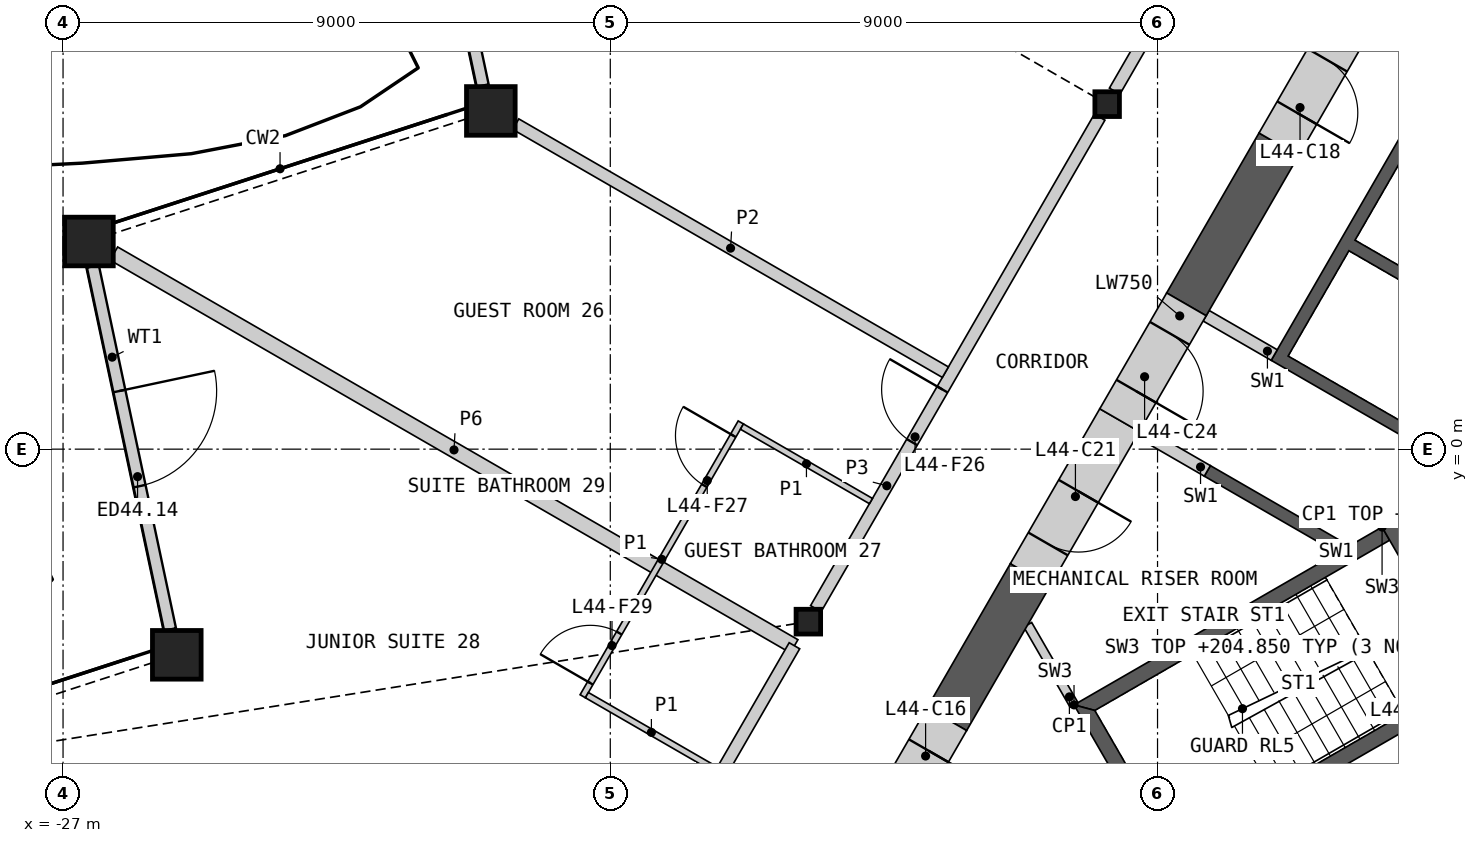
"""IFC4 building model, lengths in metres.
Left out: names, types, materials, properties, quantities, classifications, styles, units other than length and angle.
Written with IfcOpenShell. Run it as: python <this file> out.ifc"""

import sys

from ifc_helpers import new_model, si_unit, direction, frame, frame_2d, origin, origin_2d, place, context, subcontext, project, spatial, polyline, rectangle, hollow_rectangle, i_section, outline, extrude, element, fill, save


model = new_model("IFC4")
c1 = context("Model", 3, precision=1e-05, world=origin(), true_north=direction((0.0, 1.0)))
c2 = subcontext(c1, "Body", "Model", "MODEL_VIEW")
j1 = project(units=[si_unit("LENGTHUNIT", "METRE"), si_unit("PLANEANGLEUNIT", "RADIAN")], contexts=[c1])
p1 = place(None, origin())
s1 = spatial("IfcSite", under=j1, at=p1, CompositionType="ELEMENT")
p2 = place(p1, origin())
s2 = spatial("IfcBuilding", under=s1, at=p2, CompositionType="ELEMENT")
p3 = place(p2, frame((0.0, 0.0, 201.6)))
s3 = spatial("IfcBuildingStorey", under=s2, at=p3, CompositionType="ELEMENT", Elevation=201.6)
for number, where, z_axis, x_axis in (
    (1, (-19.965, 5.563, 0.0), (0.0, 0.0, 1.0), (1.0, 0.0, 0.0)),
    (2, (-26.574, 3.415, 0.0), (0.0, 0.0, 1.0), (1.0, 0.0, 0.0)),
    (3, (-25.129, -3.383, 0.0), (0.0, 0.0, 1.0), (1.0, 0.0, 0.0)),
):
    element("IfcColumn", number, at=place(p3, frame(where, z_axis=z_axis, x_axis=x_axis)), inside=s3, PredefinedType="COLUMN", context=c2, shape_type="SweptSolid", body=[
        extrude(hollow_rectangle(XDim=0.8, YDim=0.8, WallThickness=0.05, at=origin_2d()), origin(), (0.0, 0.0, 1.0), 3.6),
    ])
for number, where, z_axis, x_axis in (
    (4, (-9.828, 5.675, 0.0), (0.0, 0.0, 1.0), (1.0, 0.0, 0.0)),
    (5, (-14.743, -2.837, 0.0), (0.0, 0.0, 1.0), (1.0, 0.0, 0.0)),
):
    element("IfcColumn", number, at=place(p3, frame(where, z_axis=z_axis, x_axis=x_axis)), inside=s3, PredefinedType="COLUMN", context=c2, shape_type="SweptSolid", body=[
        extrude(i_section(OverallWidth=0.404, OverallDepth=0.407, WebThickness=0.027, FlangeThickness=0.044, at=origin_2d()), origin(), (0.0, 0.0, 1.0), 3.6),
    ])
p4 = place(p3, frame((-21.366, 11.944, 0.0), z_axis=(0.0, 0.0, 1.0), x_axis=(0.207912864597, -0.978147351238, 0.0)))
e6 = element("IfcWall", 6, at=p4, inside=s3, PredefinedType="SOLIDWALL", context=c2, shape_type="SweptSolid", body=[
    extrude(rectangle(XDim=6.098, YDim=0.2, at=frame_2d((3.049, 0.0))), origin(), (0.0, 0.0, 1.0), 2.701),
])
p5 = place(p4, frame((2.117, 0.0, 0.0)))
e7 = element("IfcOpeningElement", 7, at=p5, cuts=e6, PredefinedType="OPENING", context=c2, shape_type="SweptSolid", body=[
    extrude(rectangle(XDim=1.6, YDim=2.4, at=frame_2d((0.8, 1.2))), frame((0.0, 0.11, 0.0), z_axis=(0.0, -1.0, 0.0), x_axis=(1.0, 0.0, 0.0)), (0.0, 0.0, 1.0), 0.22),
])
p6 = place(p3, frame((-26.51, 3.006, 0.0), z_axis=(0.0, 0.0, 1.0), x_axis=(0.207920445063, -0.978145739921, 0.0)))
e8 = element("IfcWall", 8, at=p6, inside=s3, PredefinedType="SOLIDWALL", context=c2, shape_type="SweptSolid", body=[
    extrude(rectangle(XDim=6.106, YDim=0.2, at=frame_2d((3.053, 0.0))), origin(), (0.0, 0.0, 1.0), 2.701),
])
p7 = place(p6, frame((2.096, 0.0, 0.0)))
e9 = element("IfcOpeningElement", 9, at=p7, cuts=e8, PredefinedType="OPENING", context=c2, shape_type="SweptSolid", body=[
    extrude(rectangle(XDim=1.6, YDim=2.4, at=frame_2d((0.8, 1.2))), frame((0.0, 0.11, 0.0), z_axis=(0.0, -1.0, 0.0), x_axis=(1.0, 0.0, 0.0)), (0.0, 0.0, 1.0), 0.22),
])
p8 = place(p3, origin())
e10 = element("IfcWall", 10, at=p8, inside=s3, PredefinedType="SHEAR", context=c2, shape_type="SweptSolid", body=[
    extrude(outline(polyline([(-6.061, -1.697), (-8.231, -0.444), (-8.131, -0.271), (-5.96, -1.524), (-6.061, -1.697)])), origin(), (0.0, 0.0, 1.0), 3.25),
])
p9 = place(p3, origin())
e11 = element("IfcWall", 11, at=p9, inside=s3, PredefinedType="SHEAR", context=c2, shape_type="SweptSolid", body=[
    extrude(outline(polyline([(-4.96, 0.208), (-7.131, 1.461), (-3.731, 7.35), (-1.561, 6.097), (-1.66, 5.924), (-3.652, 7.074), (-4.652, 5.342), (-2.66, 4.192), (-2.76, 4.019), (-4.752, 5.169), (-5.752, 3.437), (-3.76, 2.287), (-3.861, 2.113), (-5.852, 3.263), (-6.852, 1.531), (-4.861, 0.381), (-4.96, 0.208)])), origin(), (0.0, 0.0, 1.0), 3.25),
])
for number, where, z_axis, x_axis in (
    (12, (-7.081, 1.548, 0.0), (0.0, 0.0, 1.0), (-0.866, 0.5, 0.0)),
    (13, (-8.181, -0.357, 0.0), (0.0, 0.0, 1.0), (-0.866, 0.5, 0.0)),
):
    element("IfcWall", number, at=place(p3, frame(where, z_axis=z_axis, x_axis=x_axis)), inside=s3, PredefinedType="SHEAR", context=c2, shape_type="SweptSolid", body=[
        extrude(rectangle(XDim=1.293, YDim=0.2, at=frame_2d((0.646, 0.0))), origin(), (0.0, 0.0, 1.0), 3.25),
    ])
p10 = place(p3, origin())
e14 = element("IfcWall", 14, at=p10, inside=s3, PredefinedType="SHEAR", context=c2, shape_type="SweptSolid", body=[
    extrude(outline(polyline([(-5.307, -1.281), (-10.374, -4.206), (-10.032, -4.298), (-5.182, -1.498), (-5.307, -1.281)])), origin(), (0.0, 0.0, 1.0), 3.25),
])
p11 = place(p3, origin())
e15 = element("IfcWall", 15, at=p11, inside=s3, PredefinedType="SHEAR", context=c2, shape_type="SweptSolid", body=[
    extrude(outline(polyline([(-10.374, -4.206), (-8.83, -6.881), (-8.738, -6.539), (-10.032, -4.298), (-10.374, -4.206)])), origin(), (0.0, 0.0, 1.0), 3.25),
])
p12 = place(p3, origin())
e16 = element("IfcWall", 16, at=p12, inside=s3, PredefinedType="SHEAR", context=c2, shape_type="SweptSolid", body=[
    extrude(outline(polyline([(-8.738, -6.539), (-8.83, -6.881), (-3.763, -3.956), (-3.888, -3.739), (-8.738, -6.539)])), origin(), (0.0, 0.0, 1.0), 3.25),
])
p13 = place(p3, frame((-5.199, -1.219, 0.0), z_axis=(0.0, 0.0, 1.0), x_axis=(0.499982516597, -0.866035497597, 0.0)))
e17 = element("IfcWall", 17, at=p13, inside=s3, PredefinedType="SHEAR", context=c2, shape_type="SweptSolid", body=[
    extrude(rectangle(XDim=3.088, YDim=0.25, at=frame_2d((1.544, 0.0))), origin(), (0.0, 0.0, 1.0), 3.25),
])
p14 = place(p13, frame((0.994, 0.0, 0.0)))
e18 = element("IfcOpeningElement", 18, at=p14, cuts=e17, PredefinedType="OPENING", context=c2, shape_type="SweptSolid", body=[
    extrude(rectangle(XDim=1.1, YDim=2.1, at=frame_2d((0.55, 1.05))), frame((0.0, 0.135, 0.0), z_axis=(0.0, -1.0, 0.0), x_axis=(1.0, 0.0, 0.0)), (0.0, 0.0, 1.0), 0.27),
])
p15 = place(p3, frame((-10.374, -4.206, 0.0), z_axis=(0.0, 0.0, 1.0), x_axis=(-0.500037110984, 0.866003976688, 0.0)))
e19 = element("IfcWall", 19, at=p15, inside=s3, PredefinedType="PARTITIONING", context=c2, shape_type="SweptSolid", body=[
    extrude(rectangle(XDim=1.522, YDim=0.15, at=frame_2d((0.761, 0.0))), origin(), (0.0, 0.0, 1.0), 3.25),
])
p16 = place(p3, frame((-7.006, 5.012, 0.0), z_axis=(0.0, 0.0, 1.0), x_axis=(-0.49996826437, -0.866043725583, 0.0)))
e20 = element("IfcWall", 20, at=p16, inside=s3, PredefinedType="SHEAR", context=c2, shape_type="SweptSolid", body=[
    extrude(rectangle(XDim=3.038, YDim=0.75, at=frame_2d((1.519, 0.0))), origin(), (0.0, 0.0, 1.0), 3.25),
])
p17 = place(p3, frame((-11.096, -2.07, 0.0), z_axis=(0.0, 0.0, 1.0), x_axis=(-0.49992834617, -0.86606676919, 0.0)))
e21 = element("IfcWall", 21, at=p17, inside=s3, PredefinedType="SHEAR", context=c2, shape_type="SweptSolid", body=[
    extrude(rectangle(XDim=2.737, YDim=0.75, at=frame_2d((1.369, 0.0))), origin(), (0.0, 0.0, 1.0), 3.25),
])
p18 = place(p3, frame((-12.464, -4.441, 0.0), z_axis=(0.0, 0.0, 1.0), x_axis=(-0.499994660107, -0.866028486751, 0.0)))
e22 = element("IfcWall", 22, at=p18, inside=s3, PredefinedType="SHEAR", context=c2, shape_type="SweptSolid", body=[
    extrude(rectangle(XDim=2.2, YDim=0.75, at=frame_2d((1.1, 0.0))), origin(), (0.0, 0.0, 1.0), 3.25),
])
p19 = place(p18, frame((0.6, 0.0, 0.0)))
e23 = element("IfcOpeningElement", 23, at=p19, cuts=e22, PredefinedType="OPENING", context=c2, shape_type="SweptSolid", body=[
    extrude(rectangle(XDim=1.0, YDim=2.1, at=frame_2d((0.5, 1.05))), frame((0.0, 0.385, 0.0), z_axis=(0.0, -1.0, 0.0), x_axis=(1.0, 0.0, 0.0)), (0.0, 0.0, 1.0), 0.77),
])
p20 = place(p3, frame((-5.906, 6.918, 0.0), z_axis=(0.0, 0.0, 1.0), x_axis=(-0.499946605688, -0.86605622881, 0.0)))
e24 = element("IfcWall", 24, at=p20, inside=s3, PredefinedType="SHEAR", context=c2, shape_type="SweptSolid", body=[
    extrude(rectangle(XDim=2.2, YDim=0.75, at=frame_2d((1.1, 0.0))), origin(), (0.0, 0.0, 1.0), 3.25),
])
p21 = place(p20, frame((0.6, 0.0, 0.0)))
e25 = element("IfcOpeningElement", 25, at=p21, cuts=e24, PredefinedType="OPENING", context=c2, shape_type="SweptSolid", body=[
    extrude(rectangle(XDim=1.0, YDim=2.1, at=frame_2d((0.5, 1.05))), frame((0.0, 0.385, 0.0), z_axis=(0.0, -1.0, 0.0), x_axis=(1.0, 0.0, 0.0)), (0.0, 0.0, 1.0), 0.77),
])
p22 = place(p3, frame((-9.625, 0.477, 0.0), z_axis=(0.0, 0.0, 1.0), x_axis=(-0.500005104963, -0.866022456413, 0.0)))
e26 = element("IfcWall", 26, at=p22, inside=s3, PredefinedType="SHEAR", context=c2, shape_type="SweptSolid", body=[
    extrude(rectangle(XDim=2.941, YDim=0.75, at=frame_2d((1.47, 0.0))), origin(), (0.0, 0.0, 1.0), 3.25),
])
p23 = place(p22, frame((1.35, 0.0, 0.0)))
e27 = element("IfcOpeningElement", 27, at=p23, cuts=e26, PredefinedType="OPENING", context=c2, shape_type="SweptSolid", body=[
    extrude(rectangle(XDim=1.0, YDim=2.1, at=frame_2d((0.5, 1.05))), frame((0.0, 0.385, 0.0), z_axis=(0.0, -1.0, 0.0), x_axis=(1.0, 0.0, 0.0)), (0.0, 0.0, 1.0), 0.77),
])
p24 = place(p3, frame((-8.525, 2.382, 0.0), z_axis=(0.0, 0.0, 1.0), x_axis=(-0.500077893725, -0.86598042715, 0.0)))
e28 = element("IfcWall", 28, at=p24, inside=s3, PredefinedType="SHEAR", context=c2, shape_type="SweptSolid", body=[
    extrude(rectangle(XDim=2.2, YDim=0.75, at=frame_2d((1.1, 0.0))), origin(), (0.0, 0.0, 1.0), 3.25),
])
p25 = place(p24, frame((0.55, 0.0, 0.0)))
e29 = element("IfcOpeningElement", 29, at=p25, cuts=e28, PredefinedType="OPENING", context=c2, shape_type="SweptSolid", body=[
    extrude(rectangle(XDim=1.1, YDim=2.1, at=frame_2d((0.55, 1.05))), frame((0.0, 0.385, 0.0), z_axis=(0.0, -1.0, 0.0), x_axis=(1.0, 0.0, 0.0)), (0.0, 0.0, 1.0), 0.77),
])
p26 = place(p3, frame((-26.164, 3.217, 0.0), z_axis=(0.0, 0.0, 1.0), x_axis=(0.866026026416, -0.499998921569, 0.0)))
e30 = element("IfcWall", 30, at=p26, inside=s3, PredefinedType="PARTITIONING", context=c2, shape_type="SweptSolid", body=[
    extrude(rectangle(XDim=12.918, YDim=0.25, at=frame_2d((6.459, 0.0))), origin(), (0.0, 0.0, 1.0), 2.404),
])
p27 = place(p3, frame((-9.705, 5.888, 0.0), z_axis=(0.0, 0.0, 1.0), x_axis=(0.50000393355, 0.866023132736, 0.0)))
e31 = element("IfcWall", 31, at=p27, inside=s3, PredefinedType="PARTITIONING", context=c2, shape_type="SweptSolid", body=[
    extrude(rectangle(XDim=9.335, YDim=0.2, at=frame_2d((4.667, 0.0))), origin(), (0.0, 0.0, 1.0), 3.25),
])
p28 = place(p27, frame((1.556, 0.0, 0.0)))
e32 = element("IfcOpeningElement", 32, at=p28, cuts=e31, PredefinedType="OPENING", context=c2, shape_type="SweptSolid", body=[
    extrude(rectangle(XDim=1.8, YDim=2.1, at=frame_2d((0.9, 1.05))), frame((0.0, 0.11, 0.0), z_axis=(0.0, -1.0, 0.0), x_axis=(1.0, 0.0, 0.0)), (0.0, 0.0, 1.0), 0.22),
])
p29 = place(p3, frame((-14.619, -2.624, 0.0), z_axis=(0.0, 0.0, 1.0), x_axis=(0.50000393355, 0.866023132736, 0.0)))
e33 = element("IfcWall", 33, at=p29, inside=s3, PredefinedType="PARTITIONING", context=c2, shape_type="SweptSolid", body=[
    extrude(rectangle(XDim=9.335, YDim=0.2, at=frame_2d((4.667, 0.0))), origin(), (0.0, 0.0, 1.0), 3.25),
])
p30 = place(p29, frame((3.163, 0.0, 0.0)))
e34 = element("IfcOpeningElement", 34, at=p30, cuts=e33, PredefinedType="OPENING", context=c2, shape_type="SweptSolid", body=[
    extrude(rectangle(XDim=1.0, YDim=2.1, at=frame_2d((0.5, 1.05))), frame((0.0, 0.11, 0.0), z_axis=(0.0, -1.0, 0.0), x_axis=(1.0, 0.0, 0.0)), (0.0, 0.0, 1.0), 0.22),
])
p31 = place(p3, frame((-17.744, -8.035, 0.0), z_axis=(0.0, 0.0, 1.0), x_axis=(0.500003221507, 0.866023543838, 0.0)))
e35 = element("IfcWall", 35, at=p31, inside=s3, PredefinedType="PARTITIONING", context=c2, shape_type="SweptSolid", body=[
    extrude(rectangle(XDim=5.545, YDim=0.2, at=frame_2d((2.772, 0.0))), origin(), (0.0, 0.0, 1.0), 3.25),
])
p32 = place(p31, frame((0.351, 0.0, 0.0)))
e36 = element("IfcOpeningElement", 36, at=p32, cuts=e35, PredefinedType="OPENING", context=c2, shape_type="SweptSolid", body=[
    extrude(rectangle(XDim=1.1, YDim=2.1, at=frame_2d((0.55, 1.05))), frame((0.0, 0.11, 0.0), z_axis=(0.0, -1.0, 0.0), x_axis=(1.0, 0.0, 0.0)), (0.0, 0.0, 1.0), 0.22),
])
p33 = place(p3, frame((-19.555, 5.345, 0.0), z_axis=(0.0, 0.0, 1.0), x_axis=(0.866026623601, -0.49999788721, 0.0)))
e37 = element("IfcWall", 37, at=p33, inside=s3, PredefinedType="PARTITIONING", context=c2, shape_type="SweptSolid", body=[
    extrude(rectangle(XDim=8.159, YDim=0.2, at=frame_2d((4.079, 0.0))), origin(), (0.0, 0.0, 1.0), 2.404),
])
p34 = place(p3, frame((-18.453, -4.064, 0.0), z_axis=(0.0, 0.0, 1.0), x_axis=(0.499971721724, 0.866041729639, 0.0)))
e38 = element("IfcWall", 38, at=p34, inside=s3, PredefinedType="PARTITIONING", context=c2, shape_type="SweptSolid", body=[
    extrude(rectangle(XDim=5.2, YDim=0.1, at=frame_2d((2.6, 0.0))), origin(), (0.0, 0.0, 1.0), 2.404),
])
p35 = place(p34, frame((4.0, 0.0, 0.0)))
e39 = element("IfcOpeningElement", 39, at=p35, cuts=e38, PredefinedType="OPENING", context=c2, shape_type="SweptSolid", body=[
    extrude(rectangle(XDim=0.95, YDim=2.1, at=frame_2d((0.475, 1.05))), frame((0.0, 0.06, 0.0), z_axis=(0.0, -1.0, 0.0), x_axis=(1.0, 0.0, 0.0)), (0.0, 0.0, 1.0), 0.12),
])
p36 = place(p34, frame((0.25, 0.0, 0.0)))
e40 = element("IfcOpeningElement", 40, at=p36, cuts=e38, PredefinedType="OPENING", context=c2, shape_type="SweptSolid", body=[
    extrude(rectangle(XDim=0.95, YDim=2.1, at=frame_2d((0.475, 1.05))), frame((0.0, 0.06, 0.0), z_axis=(0.0, -1.0, 0.0), x_axis=(1.0, 0.0, 0.0)), (0.0, 0.0, 1.0), 0.12),
])
p37 = place(p3, frame((-15.835, 0.371, 0.0), z_axis=(0.0, 0.0, 1.0), x_axis=(0.866014668023, -0.500018594424, 0.0)))
e41 = element("IfcWall", 41, at=p37, inside=s3, PredefinedType="PARTITIONING", context=c2, shape_type="SweptSolid", body=[
    extrude(rectangle(XDim=2.45, YDim=0.1, at=frame_2d((1.225, 0.0))), origin(), (0.0, 0.0, 1.0), 2.404),
])
p38 = place(p3, frame((-18.385, -4.046, 0.0), z_axis=(0.0, 0.0, 1.0), x_axis=(0.866057815567, -0.499943856944, 0.0)))
e42 = element("IfcWall", 42, at=p38, inside=s3, PredefinedType="PARTITIONING", context=c2, shape_type="SweptSolid", body=[
    extrude(rectangle(XDim=2.45, YDim=0.1, at=frame_2d((1.225, 0.0))), origin(), (0.0, 0.0, 1.0), 2.404),
])
p39 = place(p7, origin())
e43 = element("IfcDoor", 43, at=p39, inside=s3, OperationType="DOUBLE_DOOR_SINGLE_SWING", PredefinedType="DOOR", context=c2, shape_type="SweptSolid", body=[
    extrude(rectangle(XDim=1.6, YDim=2.4, at=frame_2d((0.8, 1.2))), frame((0.0, 0.025, 0.0), z_axis=(0.0, -1.0, 0.0), x_axis=(1.0, 0.0, 0.0)), (0.0, 0.0, 1.0), 0.05),
])
fill(e9, e43)
p40 = place(p19, origin())
e44 = element("IfcDoor", 44, at=p40, inside=s3, OperationType="SINGLE_SWING_LEFT", PredefinedType="DOOR", context=c2, shape_type="SweptSolid", body=[
    extrude(rectangle(XDim=1.0, YDim=2.1, at=frame_2d((0.5, 1.05))), frame((0.0, 0.13, 0.0), z_axis=(0.0, -1.0, 0.0), x_axis=(1.0, 0.0, 0.0)), (0.0, 0.0, 1.0), 0.05),
])
fill(e23, e44)
p41 = place(p21, origin())
e45 = element("IfcDoor", 45, at=p41, inside=s3, OperationType="SINGLE_SWING_RIGHT", PredefinedType="DOOR", context=c2, shape_type="SweptSolid", body=[
    extrude(rectangle(XDim=1.0, YDim=2.1, at=frame_2d((0.5, 1.05))), frame((0.0, 0.13, 0.0), z_axis=(0.0, -1.0, 0.0), x_axis=(1.0, 0.0, 0.0)), (0.0, 0.0, 1.0), 0.05),
])
fill(e25, e45)
p42 = place(p23, origin())
e46 = element("IfcDoor", 46, at=p42, inside=s3, OperationType="SINGLE_SWING_LEFT", PredefinedType="DOOR", context=c2, shape_type="SweptSolid", body=[
    extrude(rectangle(XDim=1.0, YDim=2.1, at=frame_2d((0.5, 1.05))), frame((0.0, 0.13, 0.0), z_axis=(0.0, -1.0, 0.0), x_axis=(1.0, 0.0, 0.0)), (0.0, 0.0, 1.0), 0.05),
])
fill(e27, e46)
p43 = place(p25, origin())
e47 = element("IfcDoor", 47, at=p43, inside=s3, OperationType="SINGLE_SWING_RIGHT", PredefinedType="DOOR", context=c2, shape_type="SweptSolid", body=[
    extrude(rectangle(XDim=1.1, YDim=2.1, at=frame_2d((0.55, 1.05))), frame((0.0, 0.13, 0.0), z_axis=(0.0, -1.0, 0.0), x_axis=(1.0, 0.0, 0.0)), (0.0, 0.0, 1.0), 0.05),
])
fill(e29, e47)
p44 = place(p30, origin())
e48 = element("IfcDoor", 48, at=p44, inside=s3, OperationType="SINGLE_SWING_RIGHT", PredefinedType="DOOR", context=c2, shape_type="SweptSolid", body=[
    extrude(rectangle(XDim=1.0, YDim=2.1, at=frame_2d((0.5, 1.05))), frame((0.0, 0.025, 0.0), z_axis=(0.0, -1.0, 0.0), x_axis=(1.0, 0.0, 0.0)), (0.0, 0.0, 1.0), 0.05),
])
fill(e34, e48)
p45 = place(p35, origin())
e49 = element("IfcDoor", 49, at=p45, inside=s3, OperationType="SINGLE_SWING_RIGHT", PredefinedType="DOOR", context=c2, shape_type="SweptSolid", body=[
    extrude(rectangle(XDim=0.95, YDim=2.1, at=frame_2d((0.475, 1.05))), frame((0.0, 0.025, 0.0), z_axis=(0.0, -1.0, 0.0), x_axis=(1.0, 0.0, 0.0)), (0.0, 0.0, 1.0), 0.05),
])
fill(e39, e49)
p46 = place(p36, origin())
e50 = element("IfcDoor", 50, at=p46, inside=s3, OperationType="SINGLE_SWING_LEFT", PredefinedType="DOOR", context=c2, shape_type="SweptSolid", body=[
    extrude(rectangle(XDim=0.95, YDim=2.1, at=frame_2d((0.475, 1.05))), frame((0.0, 0.025, 0.0), z_axis=(0.0, -1.0, 0.0), x_axis=(1.0, 0.0, 0.0)), (0.0, 0.0, 1.0), 0.05),
])
fill(e40, e50)
save(model, sys.argv[1])
